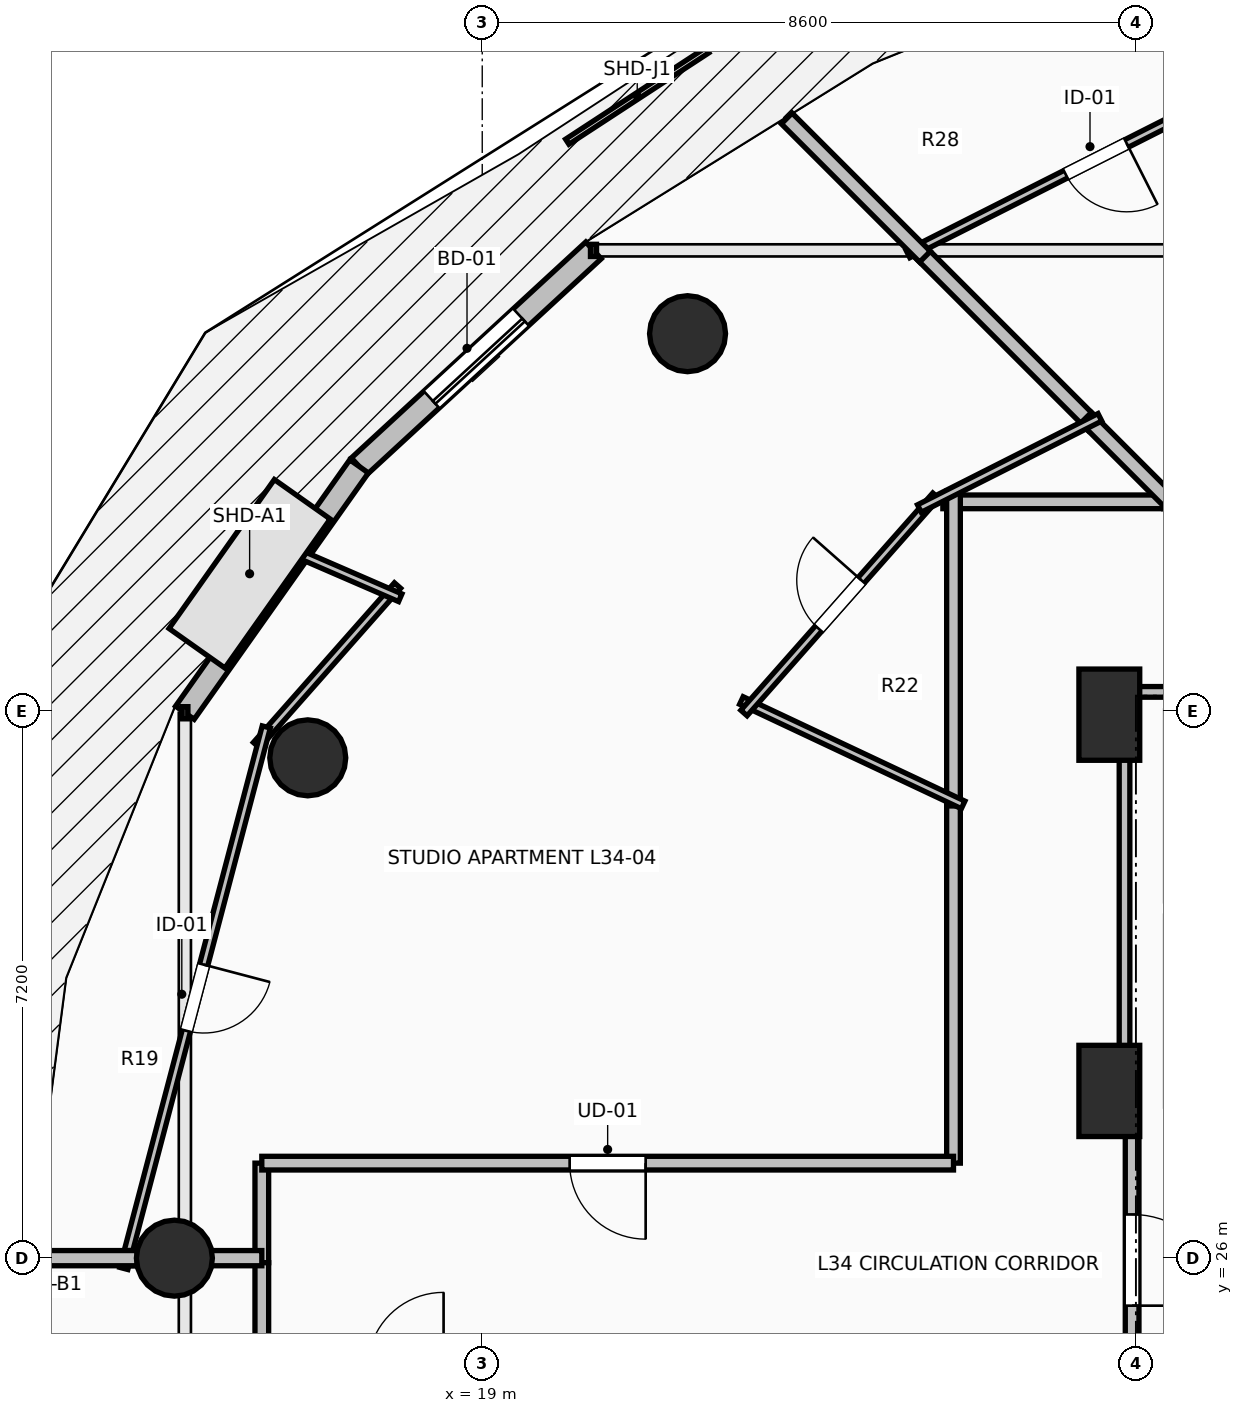
"""IFC4 building model, lengths in metres.
Left out: names, types, materials, properties, quantities, classifications, styles, units other than length and angle.
Written with IfcOpenShell. Run it as: python <this file> out.ifc"""

import sys

from ifc_helpers import new_model, si_unit, direction, frame, frame_2d, origin, origin_2d, place, context, subcontext, project, spatial, rectangle, circle, extrude, element, fill, save


model = new_model("IFC4")
c1 = context("Model", 3, precision=1e-05, world=origin(), true_north=direction((0.0, 1.0)))
c2 = subcontext(c1, "Body", "Model", "MODEL_VIEW")
j1 = project(units=[si_unit("LENGTHUNIT", "METRE"), si_unit("PLANEANGLEUNIT", "RADIAN")], contexts=[c1])
p1 = place(None, origin())
s1 = spatial("IfcSite", under=j1, at=p1, CompositionType="ELEMENT")
p2 = place(p1, origin())
s2 = spatial("IfcBuilding", under=s1, at=p2, CompositionType="ELEMENT")
p3 = place(p2, frame((0.0, 0.0, 129.1)))
s3 = spatial("IfcBuildingStorey", under=s2, at=p3, CompositionType="ELEMENT", Elevation=129.1)
for number, where, z_axis, x_axis in (
    (1, (21.701, 38.162, 0.0), (0.0, 0.0, 1.0), (-0.707, 0.707, 0.0)),
    (2, (16.705, 32.582, 0.0), (0.0, 0.0, 1.0), (-0.924, 0.383, 0.0)),
    (3, (14.95, 26.0, 0.0), (0.0, 0.0, 1.0), (-1.0, 0.0, 0.0)),
):
    element("IfcColumn", number, at=place(p3, frame(where, z_axis=z_axis, x_axis=x_axis)), inside=s3, PredefinedType="COLUMN", context=c2, shape_type="SweptSolid", body=[
        extrude(circle(Radius=0.5, at=origin_2d()), origin(), (0.0, 0.0, 1.0), 3.5),
    ])
for number, where, z_axis, x_axis in (
    (4, (27.25, 28.2, 0.0), (0.0, 0.0, 1.0), (1.0, 0.0, 0.0)),
    (5, (27.25, 33.15, 0.0), (0.0, 0.0, 1.0), (1.0, 0.0, 0.0)),
):
    element("IfcColumn", number, at=place(p3, frame(where, z_axis=z_axis, x_axis=x_axis)), inside=s3, PredefinedType="PILASTER", context=c2, shape_type="SweptSolid", body=[
        extrude(rectangle(XDim=0.8, YDim=1.2, at=origin_2d()), origin(), (0.0, 0.0, 1.0), 3.5),
    ])
p4 = place(p3, frame((20.464, 39.258, 0.0), z_axis=(0.0, 0.0, 1.0), x_axis=(-0.735477154165, -0.677549522693, 0.0)))
e6 = element("IfcWall", 6, at=p4, inside=s3, PredefinedType="STANDARD", context=c2, shape_type="SweptSolid", body=[
    extrude(rectangle(XDim=4.194, YDim=0.3, at=frame_2d((2.097, 0.0))), origin(), (0.0, 0.0, 1.0), 3.24),
])
p5 = place(p4, frame((1.297, 0.0, 0.0)))
e7 = element("IfcOpeningElement", 7, at=p5, cuts=e6, PredefinedType="OPENING", context=c2, shape_type="SweptSolid", body=[
    extrude(rectangle(XDim=1.6, YDim=2.3, at=frame_2d((0.8, 1.15))), frame((0.0, 0.165, 0.0), z_axis=(0.0, -1.0, 0.0), x_axis=(1.0, 0.0, 0.0)), (0.0, 0.0, 1.0), 0.33),
])
p6 = place(p3, frame((17.38, 36.417, 0.0), z_axis=(0.0, 0.0, 1.0), x_axis=(-0.577269753207, -0.816553508371, 0.0)))
e8 = element("IfcWall", 8, at=p6, inside=s3, PredefinedType="STANDARD", context=c2, shape_type="SweptSolid", body=[
    extrude(rectangle(XDim=3.97, YDim=0.3, at=frame_2d((1.985, 0.0))), origin(), (0.0, 0.0, 1.0), 3.24),
])
p7 = place(p3, frame((27.55, 28.0, 0.0), z_axis=(0.0, 0.0, 1.0), x_axis=(0.0, -1.0, 0.0)))
e9 = element("IfcWall", 9, at=p7, inside=s3, PredefinedType="PARTITIONING", context=c2, shape_type="SweptSolid", body=[
    extrude(rectangle(XDim=4.05, YDim=0.18, at=frame_2d((2.025, 0.0))), origin(), (0.0, 0.0, 1.0), 3.24),
])
p8 = place(p7, frame((1.425, 0.0, 0.0)))
e10 = element("IfcOpeningElement", 10, at=p8, cuts=e9, PredefinedType="OPENING", context=c2, shape_type="SweptSolid", body=[
    extrude(rectangle(XDim=1.2, YDim=2.15, at=frame_2d((0.6, 1.075))), frame((0.0, 0.105, 0.0), z_axis=(0.0, -1.0, 0.0), x_axis=(1.0, 0.0, 0.0)), (0.0, 0.0, 1.0), 0.21),
])
p9 = place(p3, frame((34.478, 35.95, 0.0), z_axis=(0.0, 0.0, 1.0), x_axis=(-1.0, 0.0, 0.0)))
e11 = element("IfcWall", 11, at=p9, inside=s3, PredefinedType="PARTITIONING", context=c2, shape_type="SweptSolid", body=[
    extrude(rectangle(XDim=6.513, YDim=0.18, at=frame_2d((3.256, 0.0))), origin(), (0.0, 0.0, 1.0), 2.432),
])
p10 = place(p9, frame((2.757, 0.0, 0.0)))
e12 = element("IfcOpeningElement", 12, at=p10, cuts=e11, PredefinedType="OPENING", context=c2, shape_type="SweptSolid", body=[
    extrude(rectangle(XDim=1.0, YDim=2.15, at=frame_2d((0.5, 1.075))), frame((0.0, 0.105, 0.0), z_axis=(0.0, -1.0, 0.0), x_axis=(1.0, 0.0, 0.0)), (0.0, 0.0, 1.0), 0.21),
])
p11 = place(p3, frame((16.1, 27.25, 0.0), z_axis=(0.0, 0.0, 1.0), x_axis=(0.0, -1.0, 0.0)))
e13 = element("IfcWall", 13, at=p11, inside=s3, PredefinedType="PARTITIONING", context=c2, shape_type="SweptSolid", body=[
    extrude(rectangle(XDim=1.31, YDim=0.18, at=frame_2d((0.655, 0.0))), origin(), (0.0, 0.0, 1.0), 2.432),
])
p12 = place(p3, frame((25.2, 32.089, 0.0), z_axis=(0.0, 0.0, 1.0), x_axis=(0.0, -1.0, 0.0)))
e14 = element("IfcWall", 14, at=p12, inside=s3, PredefinedType="PARTITIONING", context=c2, shape_type="SweptSolid", body=[
    extrude(rectangle(XDim=4.839, YDim=0.18, at=frame_2d((2.419, 0.0))), origin(), (0.0, 0.0, 1.0), 2.432),
])
p13 = place(p3, frame((25.2, 27.25, 0.0), z_axis=(0.0, 0.0, 1.0), x_axis=(-1.0, 0.0, 0.0)))
e15 = element("IfcWall", 15, at=p13, inside=s3, PredefinedType="PARTITIONING", context=c2, shape_type="SweptSolid", body=[
    extrude(rectangle(XDim=9.1, YDim=0.18, at=frame_2d((4.55, 0.0))), origin(), (0.0, 0.0, 1.0), 2.432),
])
p14 = place(p13, frame((4.05, 0.0, 0.0)))
e16 = element("IfcOpeningElement", 16, at=p14, cuts=e15, PredefinedType="OPENING", context=c2, shape_type="SweptSolid", body=[
    extrude(rectangle(XDim=1.0, YDim=2.15, at=frame_2d((0.5, 1.075))), frame((0.0, 0.105, 0.0), z_axis=(0.0, -1.0, 0.0), x_axis=(1.0, 0.0, 0.0)), (0.0, 0.0, 1.0), 0.21),
])
p15 = place(p3, frame((28.105, 35.95, 0.0), z_axis=(0.0, 0.0, 1.0), x_axis=(-1.0, 0.0, 0.0)))
e17 = element("IfcWall", 17, at=p15, inside=s3, PredefinedType="PARTITIONING", context=c2, shape_type="SweptSolid", body=[
    extrude(rectangle(XDim=3.045, YDim=0.18, at=frame_2d((1.522, 0.0))), origin(), (0.0, 0.0, 1.0), 2.432),
])
p16 = place(p3, frame((25.2, 36.09, 0.0), z_axis=(0.0, 0.0, 1.0), x_axis=(0.0, -1.0, 0.0)))
e18 = element("IfcWall", 18, at=p16, inside=s3, PredefinedType="PARTITIONING", context=c2, shape_type="SweptSolid", body=[
    extrude(rectangle(XDim=4.141, YDim=0.18, at=frame_2d((2.071, 0.0))), origin(), (0.0, 0.0, 1.0), 2.432),
])
p17 = place(p3, frame((16.1, 25.94, 0.0), z_axis=(0.0, 0.0, 1.0), x_axis=(0.0, -1.0, 0.0)))
e19 = element("IfcWall", 19, at=p17, inside=s3, PredefinedType="PARTITIONING", context=c2, shape_type="SweptSolid", body=[
    extrude(rectangle(XDim=1.39, YDim=0.18, at=frame_2d((0.695, 0.0))), origin(), (0.0, 0.0, 1.0), 2.432),
])
p18 = place(p3, frame((29.553, 41.714, 0.0), z_axis=(0.0, 0.0, 1.0), x_axis=(-0.892438454993, -0.451169152369, 0.0)))
e20 = element("IfcWall", 20, at=p18, inside=s3, PredefinedType="PARTITIONING", context=c2, shape_type="SweptSolid", body=[
    extrude(rectangle(XDim=5.549, YDim=0.11, at=frame_2d((2.774, 0.0))), origin(), (0.0, 0.0, 1.0), 2.432),
])
p19 = place(p18, frame((2.324, 0.0, 0.0)))
e21 = element("IfcOpeningElement", 21, at=p19, cuts=e20, PredefinedType="OPENING", context=c2, shape_type="SweptSolid", body=[
    extrude(rectangle(XDim=0.9, YDim=2.1, at=frame_2d((0.45, 1.05))), frame((0.0, 0.07, 0.0), z_axis=(0.0, -1.0, 0.0), x_axis=(1.0, 0.0, 0.0)), (0.0, 0.0, 1.0), 0.14),
])
p20 = place(p3, frame((24.726, 39.274, 0.0), z_axis=(0.0, 0.0, 1.0), x_axis=(0.707106781187, -0.707106781187, 0.0)))
e22 = element("IfcWall", 22, at=p20, inside=s3, PredefinedType="PARTITIONING", context=c2, shape_type="SweptSolid", body=[
    extrude(rectangle(XDim=3.277, YDim=0.2, at=frame_2d((1.638, 0.0))), origin(), (0.0, 0.0, 1.0), 2.874),
])
p21 = place(p3, frame((26.944, 37.056, 0.0), z_axis=(0.0, 0.0, 1.0), x_axis=(0.707106781187, -0.707106781187, 0.0)))
e23 = element("IfcWall", 23, at=p21, inside=s3, PredefinedType="PARTITIONING", context=c2, shape_type="SweptSolid", body=[
    extrude(rectangle(XDim=1.704, YDim=0.2, at=frame_2d((0.852, 0.0))), origin(), (0.0, 0.0, 1.0), 2.432),
])
p22 = place(p3, frame((23.006, 40.994, 0.0), z_axis=(0.0, 0.0, 1.0), x_axis=(0.707106781187, -0.707106781187, 0.0)))
e24 = element("IfcWall", 24, at=p22, inside=s3, PredefinedType="PARTITIONING", context=c2, shape_type="SweptSolid", body=[
    extrude(rectangle(XDim=2.572, YDim=0.2, at=frame_2d((1.286, 0.0))), origin(), (0.0, 0.0, 1.0), 2.728),
])
p23 = place(p3, frame((25.327, 31.963, 0.0), z_axis=(0.0, 0.0, 1.0), x_axis=(-0.904775800467, 0.425888190596, 0.0)))
e25 = element("IfcWall", 25, at=p23, inside=s3, PredefinedType="PARTITIONING", context=c2, shape_type="SweptSolid", body=[
    extrude(rectangle(XDim=3.225, YDim=0.11, at=frame_2d((1.612, 0.0))), origin(), (0.0, 0.0, 1.0), 2.922),
])
p24 = place(p3, frame((22.443, 33.172, 0.0), z_axis=(0.0, 0.0, 1.0), x_axis=(0.662199468358, 0.749327607997, 0.0)))
e26 = element("IfcWall", 26, at=p24, inside=s3, PredefinedType="PARTITIONING", context=c2, shape_type="SweptSolid", body=[
    extrude(rectangle(XDim=3.814, YDim=0.11, at=frame_2d((1.907, 0.0))), origin(), (0.0, 0.0, 1.0), 2.432),
])
p25 = place(p24, frame((1.482, 0.0, 0.0)))
e27 = element("IfcOpeningElement", 27, at=p25, cuts=e26, PredefinedType="OPENING", context=c2, shape_type="SweptSolid", body=[
    extrude(rectangle(XDim=0.85, YDim=2.1, at=frame_2d((0.425, 1.05))), frame((0.0, 0.07, 0.0), z_axis=(0.0, -1.0, 0.0), x_axis=(1.0, 0.0, 0.0)), (0.0, 0.0, 1.0), 0.14),
])
p26 = place(p3, frame((24.751, 35.862, 0.0), z_axis=(0.0, 0.0, 1.0), x_axis=(0.892455114256, 0.451136197882, 0.0)))
e28 = element("IfcWall", 28, at=p26, inside=s3, PredefinedType="PARTITIONING", context=c2, shape_type="SweptSolid", body=[
    extrude(rectangle(XDim=2.661, YDim=0.11, at=frame_2d((1.331, 0.0))), origin(), (0.0, 0.0, 1.0), 3.24),
])
p27 = place(p3, frame((17.886, 34.849, 0.0), z_axis=(0.0, 0.0, 1.0), x_axis=(-0.661981664989, -0.749520029898, 0.0)))
e29 = element("IfcWall", 29, at=p27, inside=s3, PredefinedType="PARTITIONING", context=c2, shape_type="SweptSolid", body=[
    extrude(rectangle(XDim=2.803, YDim=0.11, at=frame_2d((1.401, 0.0))), origin(), (0.0, 0.0, 1.0), 3.24),
])
p28 = place(p3, frame((16.159, 32.988, 0.0), z_axis=(0.0, 0.0, 1.0), x_axis=(-0.254441093922, -0.967088274008, 0.0)))
e30 = element("IfcWall", 30, at=p28, inside=s3, PredefinedType="PARTITIONING", context=c2, shape_type="SweptSolid", body=[
    extrude(rectangle(XDim=7.366, YDim=0.11, at=frame_2d((3.683, 0.0))), origin(), (0.0, 0.0, 1.0), 3.24),
])
p29 = place(p28, frame((3.233, 0.0, 0.0)))
e31 = element("IfcOpeningElement", 31, at=p29, cuts=e30, PredefinedType="OPENING", context=c2, shape_type="SweptSolid", body=[
    extrude(rectangle(XDim=0.9, YDim=2.1, at=frame_2d((0.45, 1.05))), frame((0.0, 0.07, 0.0), z_axis=(0.0, -1.0, 0.0), x_axis=(1.0, 0.0, 0.0)), (0.0, 0.0, 1.0), 0.14),
])
p30 = place(p3, frame((16.444, 35.329, 0.0), z_axis=(0.0, 0.0, 1.0), x_axis=(0.917553781871, -0.397611691698, 0.0)))
e32 = element("IfcWall", 32, at=p30, inside=s3, PredefinedType="PARTITIONING", context=c2, shape_type="SweptSolid", body=[
    extrude(rectangle(XDim=1.611, YDim=0.11, at=frame_2d((0.805, 0.0))), origin(), (0.0, 0.0, 1.0), 3.24),
])
p31 = place(p3, frame((14.32, 26.0, 0.0), z_axis=(0.0, 0.0, 1.0), x_axis=(1.0, 0.0, 0.0)))
e33 = element("IfcWall", 33, at=p31, inside=s3, PredefinedType="PARTITIONING", context=c2, shape_type="SweptSolid", body=[
    extrude(rectangle(XDim=1.78, YDim=0.2, at=frame_2d((0.89, 0.0))), origin(), (0.0, 0.0, 1.0), 2.432),
])
p32 = place(p3, frame((13.061, 26.0, 0.0), z_axis=(0.0, 0.0, 1.0), x_axis=(1.0, 0.0, 0.0)))
e34 = element("IfcWall", 34, at=p32, inside=s3, PredefinedType="PARTITIONING", context=c2, shape_type="SweptSolid", body=[
    extrude(rectangle(XDim=1.399, YDim=0.2, at=frame_2d((0.699, 0.0))), origin(), (0.0, 0.0, 1.0), 3.24),
])
p33 = place(p3, frame((28.894, 33.45, 0.0), z_axis=(0.0, 0.0, 1.0), x_axis=(-1.0, 0.0, 0.0)))
e35 = element("IfcWall", 35, at=p33, inside=s3, PredefinedType="PARTITIONING", context=c2, shape_type="SweptSolid", body=[
    extrude(rectangle(XDim=1.444, YDim=0.14, at=frame_2d((0.722, 0.0))), origin(), (0.0, 0.0, 1.0), 2.432),
])
p34 = place(p3, frame((27.45, 33.45, 0.0), z_axis=(0.0, 0.0, 1.0), x_axis=(0.0, -1.0, 0.0)))
e36 = element("IfcWall", 36, at=p34, inside=s3, PredefinedType="PARTITIONING", context=c2, shape_type="SweptSolid", body=[
    extrude(rectangle(XDim=5.254, YDim=0.14, at=frame_2d((2.627, 0.0))), origin(), (0.0, 0.0, 1.0), 2.432),
])
p35 = place(p5, origin())
e37 = element("IfcDoor", 37, at=p35, inside=s3, OperationType="SLIDING_TO_LEFT", PredefinedType="DOOR", context=c2, shape_type="SweptSolid", body=[
    extrude(rectangle(XDim=1.6, YDim=2.3, at=frame_2d((0.8, 1.15))), frame((0.0, 0.025, 0.0), z_axis=(0.0, -1.0, 0.0), x_axis=(1.0, 0.0, 0.0)), (0.0, 0.0, 1.0), 0.05),
])
fill(e7, e37)
p36 = place(p8, origin())
e38 = element("IfcDoor", 38, at=p36, inside=s3, OperationType="SINGLE_SWING_RIGHT", PredefinedType="DOOR", context=c2, shape_type="SweptSolid", body=[
    extrude(rectangle(XDim=1.2, YDim=2.15, at=frame_2d((0.6, 1.075))), frame((0.0, 0.025, 0.0), z_axis=(0.0, -1.0, 0.0), x_axis=(1.0, 0.0, 0.0)), (0.0, 0.0, 1.0), 0.05),
])
fill(e10, e38)
p37 = place(p14, origin())
e39 = element("IfcDoor", 39, at=p37, inside=s3, OperationType="SINGLE_SWING_LEFT", PredefinedType="DOOR", context=c2, shape_type="SweptSolid", body=[
    extrude(rectangle(XDim=1.0, YDim=2.15, at=frame_2d((0.5, 1.075))), frame((0.0, 0.025, 0.0), z_axis=(0.0, -1.0, 0.0), x_axis=(1.0, 0.0, 0.0)), (0.0, 0.0, 1.0), 0.05),
])
fill(e16, e39)
p38 = place(p19, origin())
e40 = element("IfcDoor", 40, at=p38, inside=s3, OperationType="SINGLE_SWING_LEFT", PredefinedType="DOOR", context=c2, shape_type="SweptSolid", body=[
    extrude(rectangle(XDim=0.9, YDim=2.1, at=frame_2d((0.45, 1.05))), frame((0.0, 0.025, 0.0), z_axis=(0.0, -1.0, 0.0), x_axis=(1.0, 0.0, 0.0)), (0.0, 0.0, 1.0), 0.05),
])
fill(e21, e40)
p39 = place(p25, origin())
e41 = element("IfcDoor", 41, at=p39, inside=s3, OperationType="SINGLE_SWING_RIGHT", PredefinedType="DOOR", context=c2, shape_type="SweptSolid", body=[
    extrude(rectangle(XDim=0.85, YDim=2.1, at=frame_2d((0.425, 1.05))), frame((0.0, 0.025, 0.0), z_axis=(0.0, -1.0, 0.0), x_axis=(1.0, 0.0, 0.0)), (0.0, 0.0, 1.0), 0.05),
])
fill(e27, e41)
p40 = place(p29, origin())
e42 = element("IfcDoor", 42, at=p40, inside=s3, OperationType="SINGLE_SWING_LEFT", PredefinedType="DOOR", context=c2, shape_type="SweptSolid", body=[
    extrude(rectangle(XDim=0.9, YDim=2.1, at=frame_2d((0.45, 1.05))), frame((0.0, 0.025, 0.0), z_axis=(0.0, -1.0, 0.0), x_axis=(1.0, 0.0, 0.0)), (0.0, 0.0, 1.0), 0.05),
])
fill(e31, e42)
save(model, sys.argv[1])
